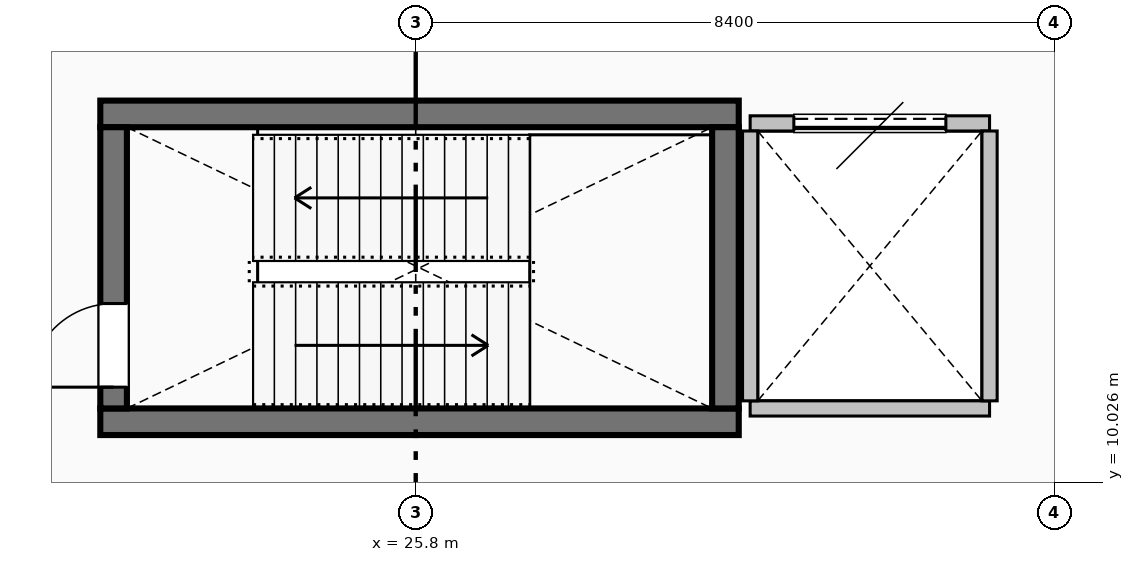
"""IFC4 building model, lengths in metres.
Left out: names, types, materials, properties, quantities, classifications, styles, units other than length and angle.
Written with IfcOpenShell. Run it as: python <this file> out.ifc"""

import sys

from ifc_helpers import new_model, si_unit, direction, frame, frame_2d, origin, place, context, subcontext, project, spatial, rectangle, extrude, element, fill, save


model = new_model("IFC4")
c1 = context("Model", 3, precision=1e-05, world=origin(), true_north=direction((0.0, 1.0)))
c2 = subcontext(c1, "Body", "Model", "MODEL_VIEW")
j1 = project(units=[si_unit("LENGTHUNIT", "METRE"), si_unit("PLANEANGLEUNIT", "RADIAN")], contexts=[c1])
p1 = place(None, origin())
s1 = spatial("IfcSite", under=j1, at=p1, CompositionType="ELEMENT")
p2 = place(p1, origin())
s2 = spatial("IfcBuilding", under=s1, at=p2, CompositionType="ELEMENT")
p3 = place(p2, frame((0.0, 0.0, 5.4)))
s3 = spatial("IfcBuildingStorey", under=s2, at=p3, CompositionType="ELEMENT", Elevation=5.4)
for number, where, z_axis, x_axis in (
    (1, (21.65, 10.825, 0.0), (0.0, 0.0, 1.0), (1.0, 0.0, 0.0)),
    (2, (30.05, 14.875, 0.0), (0.0, 0.0, 1.0), (-1.0, 0.0, 0.0)),
):
    element("IfcWall", number, at=place(p3, frame(where, z_axis=z_axis, x_axis=x_axis)), inside=s3, PredefinedType="SHEAR", context=c2, shape_type="SweptSolid", body=[
        extrude(rectangle(XDim=8.4, YDim=0.35, at=frame_2d((4.2, 0.0))), origin(), (0.0, 0.0, 1.0), 4.5),
    ])
p4 = place(p3, frame((21.825, 11.0, 0.0), z_axis=(0.0, 0.0, 1.0), x_axis=(0.0, 1.0, 0.0)))
e3 = element("IfcWall", 3, at=p4, inside=s3, PredefinedType="SHEAR", context=c2, shape_type="SweptSolid", body=[
    extrude(rectangle(XDim=3.7, YDim=0.35, at=frame_2d((1.85, 0.0))), origin(), (0.0, 0.0, 1.0), 4.5),
])
p5 = place(p4, frame((0.28, 0.0, 0.0)))
e4 = element("IfcOpeningElement", 4, at=p5, cuts=e3, PredefinedType="OPENING", context=c2, shape_type="SweptSolid", body=[
    extrude(rectangle(XDim=1.1, YDim=2.08, at=frame_2d((0.55, 1.04))), frame((0.0, 0.185, 0.0), z_axis=(0.0, -1.0, 0.0), x_axis=(1.0, 0.0, 0.0)), (0.0, 0.0, 1.0), 0.37),
])
p6 = place(p3, frame((29.875, 14.7, 0.0), z_axis=(0.0, 0.0, 1.0), x_axis=(0.0, -1.0, 0.0)))
e5 = element("IfcWall", 5, at=p6, inside=s3, PredefinedType="SHEAR", context=c2, shape_type="SweptSolid", body=[
    extrude(rectangle(XDim=3.7, YDim=0.35, at=frame_2d((1.85, 0.0))), origin(), (0.0, 0.0, 1.0), 4.5),
])
p7 = place(p3, frame((30.2, 11.0, 0.0), z_axis=(0.0, 0.0, 1.0), x_axis=(1.0, 0.0, 0.0)))
e6 = element("IfcWall", 6, at=p7, inside=s3, PredefinedType="PARTITIONING", context=c2, shape_type="SweptSolid", body=[
    extrude(rectangle(XDim=3.15, YDim=0.2, at=frame_2d((1.575, 0.0))), origin(), (0.0, 0.0, 1.0), 4.492),
])
p8 = place(p3, frame((33.35, 14.75, 0.0), z_axis=(0.0, 0.0, 1.0), x_axis=(-1.0, 0.0, 0.0)))
e7 = element("IfcWall", 7, at=p8, inside=s3, PredefinedType="PARTITIONING", context=c2, shape_type="SweptSolid", body=[
    extrude(rectangle(XDim=3.15, YDim=0.2, at=frame_2d((1.575, 0.0))), origin(), (0.0, 0.0, 1.0), 4.492),
])
p9 = place(p8, frame((0.575, 0.0, 0.0)))
e8 = element("IfcOpeningElement", 8, at=p9, cuts=e7, PredefinedType="OPENING", context=c2, shape_type="SweptSolid", body=[
    extrude(rectangle(XDim=2.0, YDim=2.35, at=frame_2d((1.0, 1.175))), frame((0.0, 0.11, 0.0), z_axis=(0.0, -1.0, 0.0), x_axis=(1.0, 0.0, 0.0)), (0.0, 0.0, 1.0), 0.22),
])
for number, where, z_axis, x_axis in (
    (9, (30.2, 11.1, 0.0), (0.0, 0.0, 1.0), (0.0, 1.0, 0.0)),
    (10, (33.35, 14.65, 0.0), (0.0, 0.0, 1.0), (0.0, -1.0, 0.0)),
):
    element("IfcWall", number, at=place(p3, frame(where, z_axis=z_axis, x_axis=x_axis)), inside=s3, PredefinedType="PARTITIONING", context=c2, shape_type="SweptSolid", body=[
        extrude(rectangle(XDim=3.55, YDim=0.2, at=frame_2d((1.775, 0.0))), origin(), (0.0, 0.0, 1.0), 4.492),
    ])
p10 = place(p5, origin())
e11 = element("IfcDoor", 11, at=p10, inside=s3, OperationType="SINGLE_SWING_LEFT", PredefinedType="DOOR", context=c2, shape_type="SweptSolid", body=[
    extrude(rectangle(XDim=1.1, YDim=2.08, at=frame_2d((0.55, 1.04))), frame((0.0, 0.025, 0.0), z_axis=(0.0, -1.0, 0.0), x_axis=(1.0, 0.0, 0.0)), (0.0, 0.0, 1.0), 0.05),
])
fill(e4, e11)
p11 = place(p9, origin())
e12 = element("IfcDoor", 12, at=p11, inside=s3, OperationType="SLIDING_TO_LEFT", PredefinedType="DOOR", context=c2, shape_type="SweptSolid", body=[
    extrude(rectangle(XDim=2.0, YDim=2.35, at=frame_2d((1.0, 1.175))), frame((0.0, 0.025, 0.0), z_axis=(0.0, -1.0, 0.0), x_axis=(1.0, 0.0, 0.0)), (0.0, 0.0, 1.0), 0.05),
])
fill(e8, e12)
save(model, sys.argv[1])
